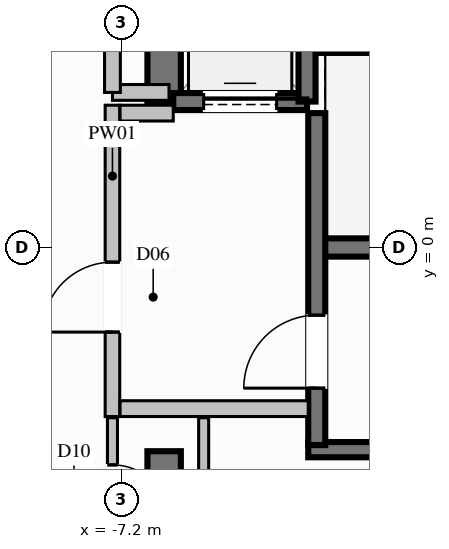
"""IFC4 building model, lengths in metres.
Left out: names, types, materials, properties, quantities, classifications, styles, units other than length and angle.
Written with IfcOpenShell. Run it as: python <this file> out.ifc"""

import sys

from ifc_helpers import new_model, si_unit, direction, frame, frame_2d, origin, place, context, subcontext, project, spatial, rectangle, extrude, element, fill, save


model = new_model("IFC4")
c1 = context("Model", 3, precision=1e-05, world=origin(), true_north=direction((0.0, 1.0)))
c2 = subcontext(c1, "Body", "Model", "MODEL_VIEW")
j1 = project(units=[si_unit("LENGTHUNIT", "METRE"), si_unit("PLANEANGLEUNIT", "RADIAN")], contexts=[c1])
p1 = place(None, origin())
s1 = spatial("IfcSite", under=j1, at=p1, CompositionType="ELEMENT")
p2 = place(p1, origin())
s2 = spatial("IfcBuilding", under=s1, at=p2, CompositionType="ELEMENT")
p3 = place(p2, frame((0.0, 0.0, 180.4)))
s3 = spatial("IfcBuildingStorey", under=s2, at=p3, CompositionType="ELEMENT", Elevation=180.4)
p4 = place(p3, frame((-3.99, 0.0, 0.0), z_axis=(0.0, 0.0, 1.0), x_axis=(1.0, 0.0, 0.0)))
e1 = element("IfcWall", 1, at=p4, inside=s3, PredefinedType="SHEAR", context=c2, shape_type="SweptSolid", body=[
    extrude(rectangle(XDim=7.98, YDim=0.3, at=frame_2d((3.99, 0.0))), origin(), (0.0, 0.0, 1.0), 3.6),
])
for number, where, z_axis, x_axis in (
    (2, (-4.13, -3.325, 0.0), (0.0, 0.0, 1.0), (1.0, 0.0, 0.0)),
    (3, (-4.13, 3.325, 0.0), (0.0, 0.0, 1.0), (1.0, 0.0, 0.0)),
):
    element("IfcWall", number, at=place(p3, frame(where, z_axis=z_axis, x_axis=x_axis)), inside=s3, PredefinedType="SOLIDWALL", context=c2, shape_type="SweptSolid", body=[
        extrude(rectangle(XDim=8.26, YDim=0.25, at=frame_2d((4.13, 0.0))), origin(), (0.0, 0.0, 1.0), 3.6),
    ])
p5 = place(p3, frame((-6.5, 2.35, 0.0), z_axis=(0.0, 0.0, 1.0), x_axis=(0.0, 1.0, 0.0)))
e4 = element("IfcWall", 4, at=p5, inside=s3, PredefinedType="SHEAR", context=c2, shape_type="SweptSolid", body=[
    extrude(rectangle(XDim=4.025, YDim=0.55, at=frame_2d((2.012, 0.0))), origin(), (0.0, 0.0, 1.0), 3.6),
])
p6 = place(p3, frame((-6.5, -6.375, 0.0), z_axis=(0.0, 0.0, 1.0), x_axis=(0.0, 1.0, 0.0)))
e5 = element("IfcWall", 5, at=p6, inside=s3, PredefinedType="SHEAR", context=c2, shape_type="SweptSolid", body=[
    extrude(rectangle(XDim=3.025, YDim=0.55, at=frame_2d((1.512, 0.0))), origin(), (0.0, 0.0, 1.0), 3.6),
])
p7 = place(p3, frame((-6.35, 2.4, 0.0), z_axis=(0.0, 0.0, 1.0), x_axis=(1.0, 0.0, 0.0)))
e6 = element("IfcWall", 6, at=p7, inside=s3, PredefinedType="SOLIDWALL", context=c2, shape_type="SweptSolid", body=[
    extrude(rectangle(XDim=2.2, YDim=0.28, at=frame_2d((1.1, 0.0))), origin(), (0.0, 0.0, 1.0), 3.36),
])
p8 = place(p7, frame((0.5, 0.0, 0.0)))
e7 = element("IfcOpeningElement", 7, at=p8, cuts=e6, PredefinedType="OPENING", context=c2, shape_type="SweptSolid", body=[
    extrude(rectangle(XDim=1.2, YDim=2.2, at=frame_2d((0.6, 1.1))), frame((0.0, 0.15, 0.0), z_axis=(0.0, -1.0, 0.0), x_axis=(1.0, 0.0, 0.0)), (0.0, 0.0, 1.0), 0.3),
])
p9 = place(p3, frame((-4.15, 2.4, 0.0), z_axis=(0.0, 0.0, 1.0), x_axis=(0.0, 1.0, 0.0)))
e8 = element("IfcWall", 8, at=p9, inside=s3, PredefinedType="SOLIDWALL", context=c2, shape_type="SweptSolid", body=[
    extrude(rectangle(XDim=2.7, YDim=0.28, at=frame_2d((1.35, 0.0))), origin(), (0.0, 0.0, 1.0), 3.36),
])
p10 = place(p3, frame((-3.99, -3.25, 0.0), z_axis=(0.0, 0.0, 1.0), x_axis=(0.0, 1.0, 0.0)))
e9 = element("IfcWall", 9, at=p10, inside=s3, PredefinedType="SOLIDWALL", context=c2, shape_type="SweptSolid", body=[
    extrude(rectangle(XDim=5.46, YDim=0.28, at=frame_2d((2.73, 0.0))), origin(), (0.0, 0.0, 1.0), 3.36),
])
p11 = place(p10, frame((0.937, 0.0, 0.0)))
e10 = element("IfcOpeningElement", 10, at=p11, cuts=e9, PredefinedType="OPENING", context=c2, shape_type="SweptSolid", body=[
    extrude(rectangle(XDim=1.2, YDim=2.2, at=frame_2d((0.6, 1.1))), frame((0.0, 0.15, 0.0), z_axis=(0.0, -1.0, 0.0), x_axis=(1.0, 0.0, 0.0)), (0.0, 0.0, 1.0), 0.3),
])
p12 = place(p3, frame((-7.35, -2.78, 0.0), z_axis=(0.0, 0.0, 1.0), x_axis=(0.0, 1.0, 0.0)))
e11 = element("IfcWall", 11, at=p12, inside=s3, PredefinedType="PARTITIONING", context=c2, shape_type="SweptSolid", body=[
    extrude(rectangle(XDim=5.12, YDim=0.24, at=frame_2d((2.56, 0.0))), origin(), (0.0, 0.0, 1.0), 2.445),
])
p13 = place(p12, frame((1.389, 0.0, 0.0)))
e12 = element("IfcOpeningElement", 12, at=p13, cuts=e11, PredefinedType="OPENING", context=c2, shape_type="SweptSolid", body=[
    extrude(rectangle(XDim=1.15, YDim=2.2, at=frame_2d((0.575, 1.1))), frame((0.0, 0.13, 0.0), z_axis=(0.0, -1.0, 0.0), x_axis=(1.0, 0.0, 0.0)), (0.0, 0.0, 1.0), 0.26),
])
p14 = place(p3, frame((-7.225, -2.65, 0.0), z_axis=(0.0, 0.0, 1.0), x_axis=(1.0, 0.0, 0.0)))
e13 = element("IfcWall", 13, at=p14, inside=s3, PredefinedType="PARTITIONING", context=c2, shape_type="SweptSolid", body=[
    extrude(rectangle(XDim=3.095, YDim=0.26, at=frame_2d((1.548, 0.0))), origin(), (0.0, 0.0, 1.0), 3.36),
])
p15 = place(p3, frame((-7.225, 2.21, 0.0), z_axis=(0.0, 0.0, 1.0), x_axis=(1.0, 0.0, 0.0)))
e14 = element("IfcWall", 14, at=p15, inside=s3, PredefinedType="PARTITIONING", context=c2, shape_type="SweptSolid", body=[
    extrude(rectangle(XDim=0.875, YDim=0.26, at=frame_2d((0.438, 0.0))), origin(), (0.0, 0.0, 1.0), 3.36),
])
p16 = place(p3, frame((-7.35, 2.55, 0.0), z_axis=(0.0, 0.0, 1.0), x_axis=(1.0, 0.0, 0.0)))
e15 = element("IfcWall", 15, at=p16, inside=s3, PredefinedType="PARTITIONING", context=c2, shape_type="SweptSolid", body=[
    extrude(rectangle(XDim=0.93, YDim=0.26, at=frame_2d((0.465, 0.0))), origin(), (0.0, 0.0, 1.0), 3.36),
])
p17 = place(p3, frame((-7.35, 2.55, 0.0), z_axis=(0.0, 0.0, 1.0), x_axis=(0.0, 1.0, 0.0)))
e16 = element("IfcWall", 16, at=p17, inside=s3, PredefinedType="PARTITIONING", context=c2, shape_type="SweptSolid", body=[
    extrude(rectangle(XDim=2.4, YDim=0.26, at=frame_2d((1.2, 0.0))), origin(), (0.0, 0.0, 1.0), 2.445),
])
p18 = place(p17, frame((0.775, 0.0, 0.0)))
e17 = element("IfcOpeningElement", 17, at=p18, cuts=e16, PredefinedType="OPENING", context=c2, shape_type="SweptSolid", body=[
    extrude(rectangle(XDim=0.85, YDim=2.05, at=frame_2d((0.425, 1.025))), frame((0.0, 0.14, 0.0), z_axis=(0.0, -1.0, 0.0), x_axis=(1.0, 0.0, 0.0)), (0.0, 0.0, 1.0), 0.28),
])
p19 = place(p3, frame((-5.85, -5.3, 0.0), z_axis=(0.0, 0.0, 1.0), x_axis=(0.0, 1.0, 0.0)))
e18 = element("IfcWall", 18, at=p19, inside=s3, PredefinedType="PARTITIONING", context=c2, shape_type="SweptSolid", body=[
    extrude(rectangle(XDim=2.5, YDim=0.165, at=frame_2d((1.25, 0.0))), origin(), (0.0, 0.0, 1.0), 2.445),
])
p20 = place(p3, frame((-7.35, -2.8, 0.0), z_axis=(0.0, 0.0, 1.0), x_axis=(0.0, -1.0, 0.0)))
e19 = element("IfcWall", 19, at=p20, inside=s3, PredefinedType="PARTITIONING", context=c2, shape_type="SweptSolid", body=[
    extrude(rectangle(XDim=2.5, YDim=0.165, at=frame_2d((1.25, 0.0))), origin(), (0.0, 0.0, 1.0), 3.36),
])
p21 = place(p20, frame((0.775, 0.0, 0.0)))
e20 = element("IfcOpeningElement", 20, at=p21, cuts=e19, PredefinedType="OPENING", context=c2, shape_type="SweptSolid", body=[
    extrude(rectangle(XDim=0.95, YDim=2.1, at=frame_2d((0.475, 1.05))), frame((0.0, 0.093, 0.0), z_axis=(0.0, -1.0, 0.0), x_axis=(1.0, 0.0, 0.0)), (0.0, 0.0, 1.0), 0.185),
])
p22 = place(p8, origin())
e21 = element("IfcDoor", 21, at=p22, inside=s3, OperationType="SLIDING_TO_LEFT", PredefinedType="DOOR", context=c2, shape_type="SweptSolid", body=[
    extrude(rectangle(XDim=1.2, YDim=2.2, at=frame_2d((0.6, 1.1))), frame((0.0, 0.025, 0.0), z_axis=(0.0, -1.0, 0.0), x_axis=(1.0, 0.0, 0.0)), (0.0, 0.0, 1.0), 0.05),
])
fill(e7, e21)
p23 = place(p11, origin())
e22 = element("IfcDoor", 22, at=p23, inside=s3, OperationType="SINGLE_SWING_LEFT", PredefinedType="DOOR", context=c2, shape_type="SweptSolid", body=[
    extrude(rectangle(XDim=1.2, YDim=2.2, at=frame_2d((0.6, 1.1))), frame((0.0, 0.025, 0.0), z_axis=(0.0, -1.0, 0.0), x_axis=(1.0, 0.0, 0.0)), (0.0, 0.0, 1.0), 0.05),
])
fill(e10, e22)
p24 = place(p13, origin())
e23 = element("IfcDoor", 23, at=p24, inside=s3, OperationType="SINGLE_SWING_LEFT", PredefinedType="DOOR", context=c2, shape_type="SweptSolid", body=[
    extrude(rectangle(XDim=1.15, YDim=2.2, at=frame_2d((0.575, 1.1))), frame((0.0, 0.025, 0.0), z_axis=(0.0, -1.0, 0.0), x_axis=(1.0, 0.0, 0.0)), (0.0, 0.0, 1.0), 0.05),
])
fill(e12, e23)
p25 = place(p21, origin())
e24 = element("IfcDoor", 24, at=p25, inside=s3, OperationType="SINGLE_SWING_RIGHT", PredefinedType="DOOR", context=c2, shape_type="SweptSolid", body=[
    extrude(rectangle(XDim=0.95, YDim=2.1, at=frame_2d((0.475, 1.05))), frame((0.0, 0.025, 0.0), z_axis=(0.0, -1.0, 0.0), x_axis=(1.0, 0.0, 0.0)), (0.0, 0.0, 1.0), 0.05),
])
fill(e20, e24)
save(model, sys.argv[1])
